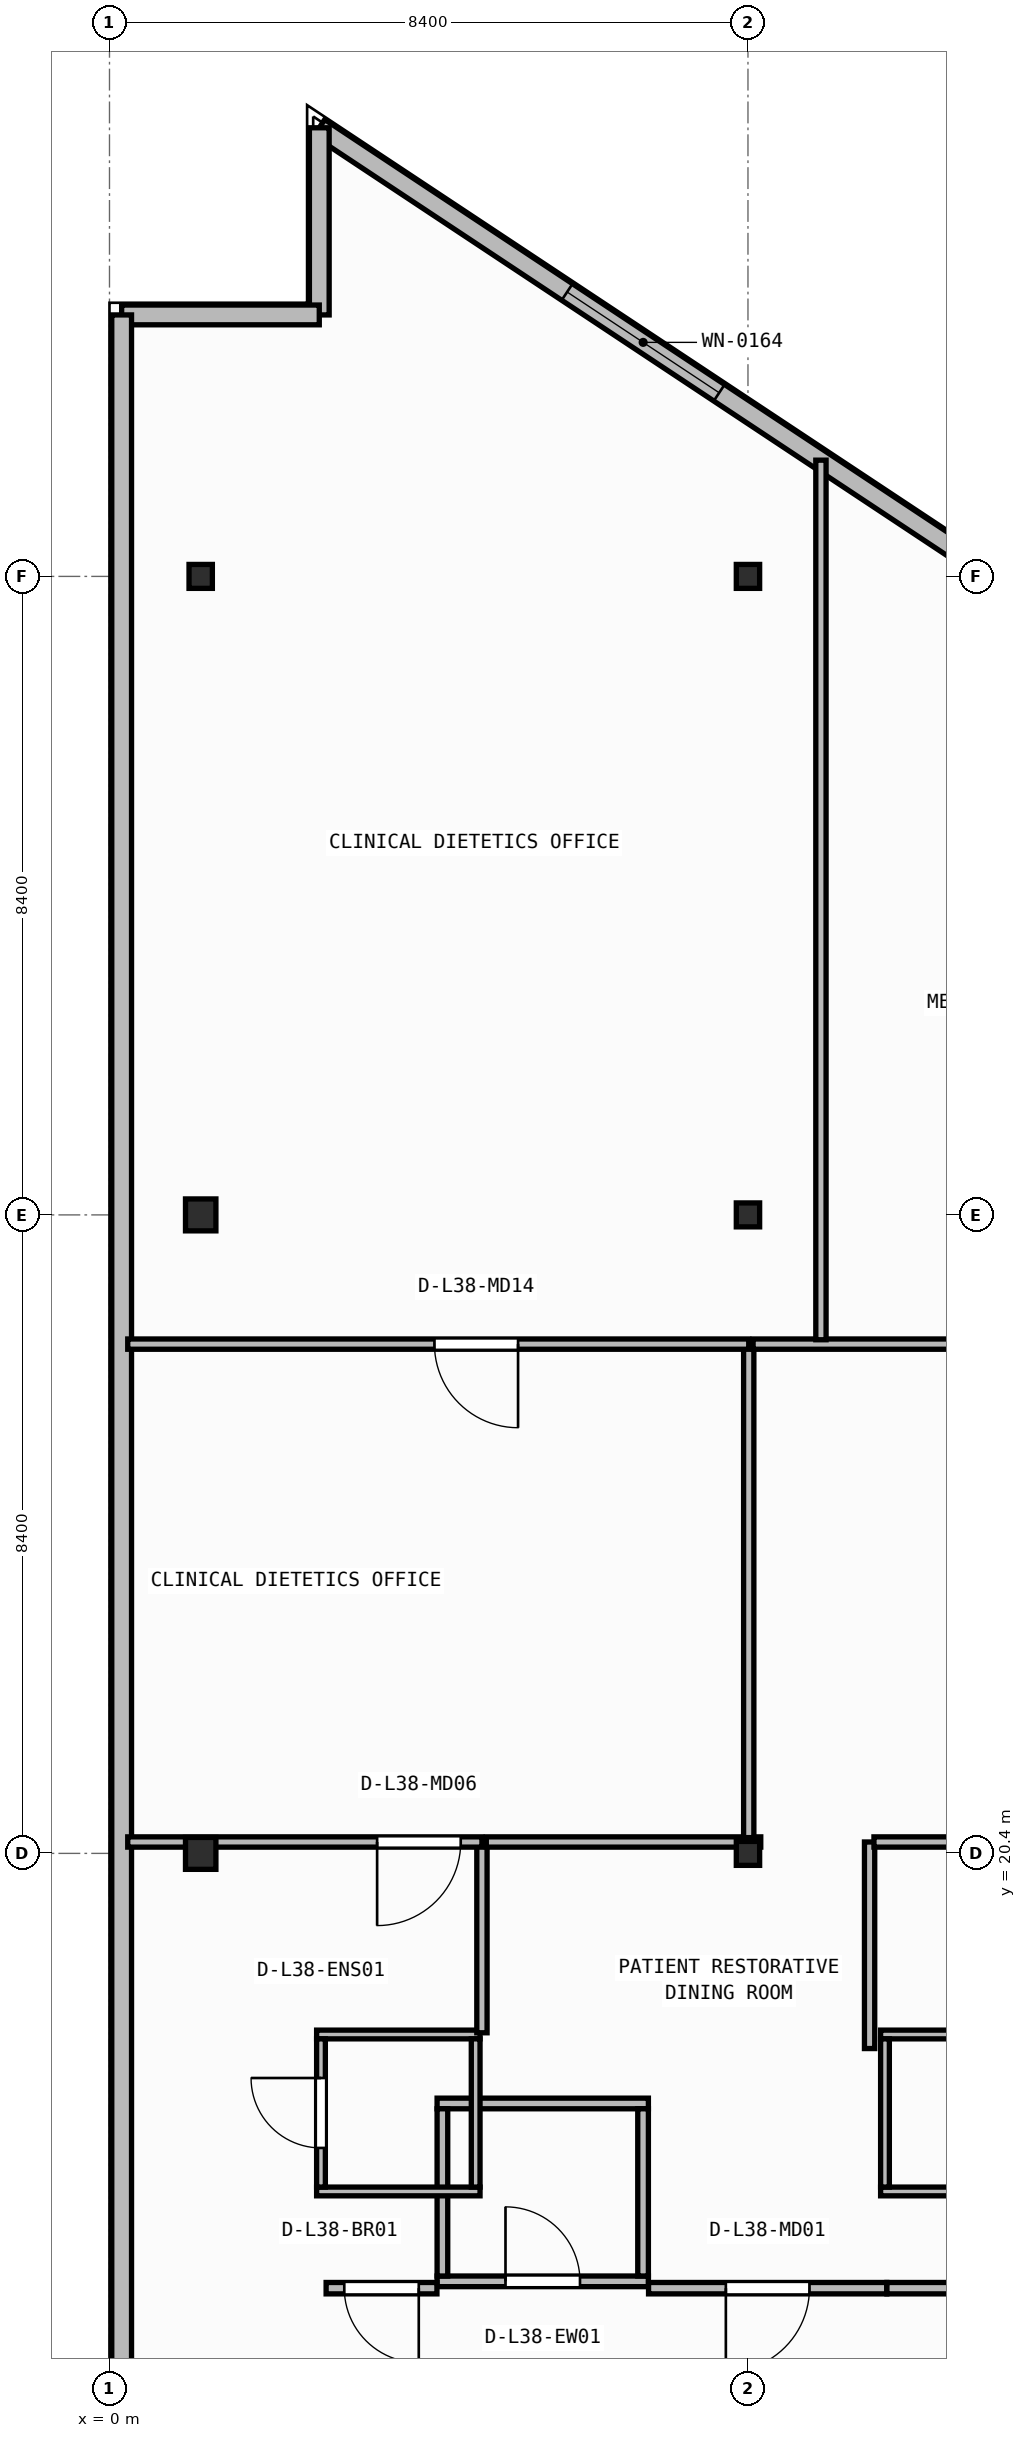
"""IFC4 building model, lengths in metres.
Left out: names, types, materials, properties, quantities, classifications, styles, units other than length and angle.
Written with IfcOpenShell. Run it as: python <this file> out.ifc"""

import sys

from ifc_helpers import new_model, si_unit, direction, frame, frame_2d, origin, origin_2d, place, context, subcontext, project, spatial, rectangle, i_section, extrude, element, fill, save


model = new_model("IFC4")
c1 = context("Model", 3, precision=1e-05, world=origin(), true_north=direction((0.0, 1.0)))
c2 = subcontext(c1, "Body", "Model", "MODEL_VIEW")
j1 = project(units=[si_unit("LENGTHUNIT", "METRE"), si_unit("PLANEANGLEUNIT", "RADIAN")], contexts=[c1])
p1 = place(None, origin())
s1 = spatial("IfcSite", under=j1, at=p1, CompositionType="ELEMENT")
p2 = place(p1, origin())
s2 = spatial("IfcBuilding", under=s1, at=p2, CompositionType="ELEMENT")
p3 = place(p2, frame((0.0, 0.0, 154.7)))
s3 = spatial("IfcBuildingStorey", under=s2, at=p3, CompositionType="ELEMENT", Elevation=154.7)
p4 = place(p3, frame((1.2, 20.4, 0.0), z_axis=(0.0, 0.0, 1.0), x_axis=(1.0, 0.0, 0.0)))
e1 = element("IfcColumn", 1, at=p4, inside=s3, PredefinedType="COLUMN", context=c2, shape_type="SweptSolid", body=[
    extrude(i_section(OverallWidth=0.4, OverallDepth=0.42, WebThickness=0.025, FlangeThickness=0.04, at=origin_2d()), origin(), (0.0, 0.0, 1.0), 3.95),
])
p5 = place(p3, frame((8.4, 20.4, 0.0), z_axis=(0.0, 0.0, 1.0), x_axis=(1.0, 0.0, 0.0)))
e2 = element("IfcColumn", 2, at=p5, inside=s3, PredefinedType="COLUMN", context=c2, shape_type="SweptSolid", body=[
    extrude(i_section(OverallWidth=0.307, OverallDepth=0.315, WebThickness=0.012, FlangeThickness=0.019, FilletRadius=0.017, at=origin_2d()), origin(), (0.0, 0.0, 1.0), 3.95),
])
p6 = place(p3, frame((1.2, 28.8, 0.0), z_axis=(0.0, 0.0, 1.0), x_axis=(1.0, 0.0, 0.0)))
e3 = element("IfcColumn", 3, at=p6, inside=s3, PredefinedType="COLUMN", context=c2, shape_type="SweptSolid", body=[
    extrude(i_section(OverallWidth=0.4, OverallDepth=0.42, WebThickness=0.025, FlangeThickness=0.04, at=origin_2d()), origin(), (0.0, 0.0, 1.0), 3.95),
])
for number, where, z_axis, x_axis in (
    (4, (8.4, 28.8, 0.0), (0.0, 0.0, 1.0), (1.0, 0.0, 0.0)),
    (5, (1.2, 37.2, 0.0), (0.0, 0.0, 1.0), (1.0, 0.0, 0.0)),
    (6, (8.4, 37.2, 0.0), (0.0, 0.0, 1.0), (1.0, 0.0, 0.0)),
):
    element("IfcColumn", number, at=place(p3, frame(where, z_axis=z_axis, x_axis=x_axis)), inside=s3, PredefinedType="COLUMN", context=c2, shape_type="SweptSolid", body=[
        extrude(i_section(OverallWidth=0.307, OverallDepth=0.315, WebThickness=0.012, FlangeThickness=0.019, FilletRadius=0.017, at=origin_2d()), origin(), (0.0, 0.0, 1.0), 3.95),
    ])
p7 = place(p3, frame((11.282, 37.456, 0.0), z_axis=(0.0, 0.0, 1.0), x_axis=(-0.833630474253, 0.552322580017, 0.0)))
e7 = element("IfcWall", 7, at=p7, inside=s3, PredefinedType="STANDARD", context=c2, shape_type="SweptSolid", body=[
    extrude(rectangle(XDim=10.223, YDim=0.26, at=frame_2d((5.111, 0.0))), origin(), (0.0, 0.0, 1.0), 3.71),
])
p8 = place(p7, frame((3.911, 0.0, 0.9)))
e8 = element("IfcOpeningElement", 8, at=p8, cuts=e7, PredefinedType="OPENING", context=c2, shape_type="SweptSolid", body=[
    extrude(rectangle(XDim=2.4, YDim=1.65, at=frame_2d((1.2, 0.825))), frame((0.0, 0.14, 0.0), z_axis=(0.0, -1.0, 0.0), x_axis=(1.0, 0.0, 0.0)), (0.0, 0.0, 1.0), 0.28),
])
p9 = place(p3, frame((2.76, 43.102, 0.0), z_axis=(0.0, 0.0, 1.0), x_axis=(0.0, -1.0, 0.0)))
e9 = element("IfcWall", 9, at=p9, inside=s3, PredefinedType="STANDARD", context=c2, shape_type="SweptSolid", body=[
    extrude(rectangle(XDim=2.462, YDim=0.26, at=frame_2d((1.231, 0.0))), origin(), (0.0, 0.0, 1.0), 3.71),
])
p10 = place(p3, frame((2.76, 40.64, 0.0), z_axis=(0.0, 0.0, 1.0), x_axis=(-1.0, 0.0, 0.0)))
e10 = element("IfcWall", 10, at=p10, inside=s3, PredefinedType="STANDARD", context=c2, shape_type="SweptSolid", body=[
    extrude(rectangle(XDim=2.6, YDim=0.26, at=frame_2d((1.3, 0.0))), origin(), (0.0, 0.0, 1.0), 3.71),
])
p11 = place(p3, frame((0.16, 40.64, 0.0), z_axis=(0.0, 0.0, 1.0), x_axis=(0.0, -1.0, 0.0)))
e11 = element("IfcWall", 11, at=p11, inside=s3, PredefinedType="STANDARD", context=c2, shape_type="SweptSolid", body=[
    extrude(rectangle(XDim=37.88, YDim=0.26, at=frame_2d((18.94, 0.0))), origin(), (0.0, 0.0, 1.0), 3.71),
])
p12 = place(p11, frame((27.795, 0.0, 0.9)))
e12 = element("IfcOpeningElement", 12, at=p12, cuts=e11, PredefinedType="OPENING", context=c2, shape_type="SweptSolid", body=[
    extrude(rectangle(XDim=2.4, YDim=1.65, at=frame_2d((1.2, 0.825))), frame((0.0, 0.14, 0.0), z_axis=(0.0, -1.0, 0.0), x_axis=(1.0, 0.0, 0.0)), (0.0, 0.0, 1.0), 0.28),
])
p13 = place(p3, frame((4.31, 14.77, 0.0), z_axis=(0.0, 0.0, 1.0), x_axis=(1.0, 0.0, 0.0)))
e13 = element("IfcWall", 13, at=p13, inside=s3, PredefinedType="PARTITIONING", context=c2, shape_type="SweptSolid", body=[
    extrude(rectangle(XDim=2.78, YDim=0.14, at=frame_2d((1.39, 0.0))), origin(), (0.0, 0.0, 1.0), 3.71),
])
p14 = place(p13, frame((0.9, 0.0, 0.0)))
e14 = element("IfcOpeningElement", 14, at=p14, cuts=e13, PredefinedType="OPENING", context=c2, shape_type="SweptSolid", body=[
    extrude(rectangle(XDim=0.98, YDim=2.1, at=frame_2d((0.49, 1.05))), frame((0.0, 0.08, 0.0), z_axis=(0.0, -1.0, 0.0), x_axis=(1.0, 0.0, 0.0)), (0.0, 0.0, 1.0), 0.16),
])
p15 = place(p3, frame((4.31, 17.11, 0.0), z_axis=(0.0, 0.0, 1.0), x_axis=(1.0, 0.0, 0.0)))
e15 = element("IfcWall", 15, at=p15, inside=s3, PredefinedType="PARTITIONING", context=c2, shape_type="SweptSolid", body=[
    extrude(rectangle(XDim=2.78, YDim=0.14, at=frame_2d((1.39, 0.0))), origin(), (0.0, 0.0, 1.0), 3.71),
])
for number, where, z_axis, x_axis in (
    (16, (4.38, 14.84, 0.0), (0.0, 0.0, 1.0), (0.0, 1.0, 0.0)),
    (17, (7.02, 14.84, 0.0), (0.0, 0.0, 1.0), (0.0, 1.0, 0.0)),
):
    element("IfcWall", number, at=place(p3, frame(where, z_axis=z_axis, x_axis=x_axis)), inside=s3, PredefinedType="PARTITIONING", context=c2, shape_type="SweptSolid", body=[
        extrude(rectangle(XDim=2.2, YDim=0.14, at=frame_2d((1.1, 0.0))), origin(), (0.0, 0.0, 1.0), 3.71),
    ])
for number, where, z_axis, x_axis in (
    (18, (2.725, 15.952, 0.0), (0.0, 0.0, 1.0), (1.0, 0.0, 0.0)),
    (19, (2.725, 18.018, 0.0), (0.0, 0.0, 1.0), (1.0, 0.0, 0.0)),
):
    element("IfcWall", number, at=place(p3, frame(where, z_axis=z_axis, x_axis=x_axis)), inside=s3, PredefinedType="PARTITIONING", context=c2, shape_type="SweptSolid", body=[
        extrude(rectangle(XDim=2.15, YDim=0.115, at=frame_2d((1.075, 0.0))), origin(), (0.0, 0.0, 1.0), 3.71),
    ])
p16 = place(p3, frame((2.782, 16.01, 0.0), z_axis=(0.0, 0.0, 1.0), x_axis=(0.0, 1.0, 0.0)))
e20 = element("IfcWall", 20, at=p16, inside=s3, PredefinedType="PARTITIONING", context=c2, shape_type="SweptSolid", body=[
    extrude(rectangle(XDim=1.95, YDim=0.115, at=frame_2d((0.975, 0.0))), origin(), (0.0, 0.0, 1.0), 3.71),
])
p17 = place(p16, frame((0.515, 0.0, 0.0)))
e21 = element("IfcOpeningElement", 21, at=p17, cuts=e20, PredefinedType="OPENING", context=c2, shape_type="SweptSolid", body=[
    extrude(rectangle(XDim=0.92, YDim=2.1, at=frame_2d((0.46, 1.05))), frame((0.0, 0.067, 0.0), z_axis=(0.0, -1.0, 0.0), x_axis=(1.0, 0.0, 0.0)), (0.0, 0.0, 1.0), 0.135),
])
p18 = place(p3, frame((4.817, 16.01, 0.0), z_axis=(0.0, 0.0, 1.0), x_axis=(0.0, 1.0, 0.0)))
e22 = element("IfcWall", 22, at=p18, inside=s3, PredefinedType="PARTITIONING", context=c2, shape_type="SweptSolid", body=[
    extrude(rectangle(XDim=1.95, YDim=0.115, at=frame_2d((0.975, 0.0))), origin(), (0.0, 0.0, 1.0), 3.71),
])
for number, where, z_axis, x_axis in (
    (23, (10.145, 15.952, 0.0), (0.0, 0.0, 1.0), (1.0, 0.0, 0.0)),
    (24, (10.145, 18.018, 0.0), (0.0, 0.0, 1.0), (1.0, 0.0, 0.0)),
):
    element("IfcWall", number, at=place(p3, frame(where, z_axis=z_axis, x_axis=x_axis)), inside=s3, PredefinedType="PARTITIONING", context=c2, shape_type="SweptSolid", body=[
        extrude(rectangle(XDim=2.15, YDim=0.115, at=frame_2d((1.075, 0.0))), origin(), (0.0, 0.0, 1.0), 3.71),
    ])
p19 = place(p3, frame((10.202, 16.01, 0.0), z_axis=(0.0, 0.0, 1.0), x_axis=(0.0, 1.0, 0.0)))
e25 = element("IfcWall", 25, at=p19, inside=s3, PredefinedType="PARTITIONING", context=c2, shape_type="SweptSolid", body=[
    extrude(rectangle(XDim=1.95, YDim=0.115, at=frame_2d((0.975, 0.0))), origin(), (0.0, 0.0, 1.0), 3.71),
])
p20 = place(p3, frame((4.308, 14.68, 0.0), z_axis=(0.0, 0.0, 1.0), x_axis=(-1.0, 0.0, 0.0)))
e26 = element("IfcWall", 26, at=p20, inside=s3, PredefinedType="PARTITIONING", context=c2, shape_type="SweptSolid", body=[
    extrude(rectangle(XDim=1.458, YDim=0.15, at=frame_2d((0.729, 0.0))), origin(), (0.0, 0.0, 1.0), 3.71),
])
p21 = place(p20, frame((0.239, 0.0, 0.0)))
e27 = element("IfcOpeningElement", 27, at=p21, cuts=e26, PredefinedType="OPENING", context=c2, shape_type="SweptSolid", body=[
    extrude(rectangle(XDim=0.98, YDim=2.1, at=frame_2d((0.49, 1.05))), frame((0.0, 0.085, 0.0), z_axis=(0.0, -1.0, 0.0), x_axis=(1.0, 0.0, 0.0)), (0.0, 0.0, 1.0), 0.17),
])
p22 = place(p3, frame((10.226, 14.68, 0.0), z_axis=(0.0, 0.0, 1.0), x_axis=(-1.0, 0.0, 0.0)))
e28 = element("IfcWall", 28, at=p22, inside=s3, PredefinedType="PARTITIONING", context=c2, shape_type="SweptSolid", body=[
    extrude(rectangle(XDim=3.134, YDim=0.15, at=frame_2d((1.567, 0.0))), origin(), (0.0, 0.0, 1.0), 3.71),
])
p23 = place(p22, frame((1.017, 0.0, 0.0)))
e29 = element("IfcOpeningElement", 29, at=p23, cuts=e28, PredefinedType="OPENING", context=c2, shape_type="SweptSolid", body=[
    extrude(rectangle(XDim=1.1, YDim=2.1, at=frame_2d((0.55, 1.05))), frame((0.0, 0.085, 0.0), z_axis=(0.0, -1.0, 0.0), x_axis=(1.0, 0.0, 0.0)), (0.0, 0.0, 1.0), 0.17),
])
p24 = place(p3, frame((14.566, 14.68, 0.0), z_axis=(0.0, 0.0, 1.0), x_axis=(-1.0, 0.0, 0.0)))
e30 = element("IfcWall", 30, at=p24, inside=s3, PredefinedType="PARTITIONING", context=c2, shape_type="SweptSolid", body=[
    extrude(rectangle(XDim=4.338, YDim=0.15, at=frame_2d((2.169, 0.0))), origin(), (0.0, 0.0, 1.0), 3.71),
])
p25 = place(p24, frame((1.619, 0.0, 0.0)))
e31 = element("IfcOpeningElement", 31, at=p25, cuts=e30, PredefinedType="OPENING", context=c2, shape_type="SweptSolid", body=[
    extrude(rectangle(XDim=1.1, YDim=2.1, at=frame_2d((0.55, 1.05))), frame((0.0, 0.085, 0.0), z_axis=(0.0, -1.0, 0.0), x_axis=(1.0, 0.0, 0.0)), (0.0, 0.0, 1.0), 0.17),
])
p26 = place(p3, frame((4.9, 18.04, 0.0), z_axis=(0.0, 0.0, 1.0), x_axis=(0.0, 1.0, 0.0)))
e32 = element("IfcWall", 32, at=p26, inside=s3, PredefinedType="PARTITIONING", context=c2, shape_type="SweptSolid", body=[
    extrude(rectangle(XDim=2.51, YDim=0.135, at=frame_2d((1.255, 0.0))), origin(), (0.0, 0.0, 1.0), 3.71),
])
p27 = place(p3, frame((4.9, 20.55, 0.0), z_axis=(0.0, 0.0, 1.0), x_axis=(-1.0, 0.0, 0.0)))
e33 = element("IfcWall", 33, at=p27, inside=s3, PredefinedType="PARTITIONING", context=c2, shape_type="SweptSolid", body=[
    extrude(rectangle(XDim=4.66, YDim=0.135, at=frame_2d((2.33, 0.0))), origin(), (0.0, 0.0, 1.0), 3.083),
])
p28 = place(p27, frame((0.279, 0.0, 0.0)))
e34 = element("IfcOpeningElement", 34, at=p28, cuts=e33, PredefinedType="OPENING", context=c2, shape_type="SweptSolid", body=[
    extrude(rectangle(XDim=1.1, YDim=2.1, at=frame_2d((0.55, 1.05))), frame((0.0, 0.077, 0.0), z_axis=(0.0, -1.0, 0.0), x_axis=(1.0, 0.0, 0.0)), (0.0, 0.0, 1.0), 0.155),
])
p29 = place(p3, frame((10.0, 17.833, 0.0), z_axis=(0.0, 0.0, 1.0), x_axis=(0.0, 1.0, 0.0)))
e35 = element("IfcWall", 35, at=p29, inside=s3, PredefinedType="PARTITIONING", context=c2, shape_type="SweptSolid", body=[
    extrude(rectangle(XDim=2.718, YDim=0.135, at=frame_2d((1.359, 0.0))), origin(), (0.0, 0.0, 1.0), 3.71),
])
p30 = place(p3, frame((8.568, 20.55, 0.0), z_axis=(0.0, 0.0, 1.0), x_axis=(-1.0, 0.0, 0.0)))
e36 = element("IfcWall", 36, at=p30, inside=s3, PredefinedType="PARTITIONING", context=c2, shape_type="SweptSolid", body=[
    extrude(rectangle(XDim=3.611, YDim=0.135, at=frame_2d((1.805, 0.0))), origin(), (0.0, 0.0, 1.0), 3.083),
])
p31 = place(p3, frame((14.34, 20.55, 0.0), z_axis=(0.0, 0.0, 1.0), x_axis=(-1.0, 0.0, 0.0)))
e37 = element("IfcWall", 37, at=p31, inside=s3, PredefinedType="PARTITIONING", context=c2, shape_type="SweptSolid", body=[
    extrude(rectangle(XDim=4.282, YDim=0.135, at=frame_2d((2.141, 0.0))), origin(), (0.0, 0.0, 1.0), 3.083),
])
p32 = place(p3, frame((8.41, 20.607, 0.0), z_axis=(0.0, 0.0, 1.0), x_axis=(0.0, 1.0, 0.0)))
e38 = element("IfcWall", 38, at=p32, inside=s3, PredefinedType="PARTITIONING", context=c2, shape_type="SweptSolid", body=[
    extrude(rectangle(XDim=6.493, YDim=0.135, at=frame_2d((3.246, 0.0))), origin(), (0.0, 0.0, 1.0), 3.152),
])
p33 = place(p3, frame((8.41, 27.1, 0.0), z_axis=(0.0, 0.0, 1.0), x_axis=(-1.0, 0.0, 0.0)))
e39 = element("IfcWall", 39, at=p33, inside=s3, PredefinedType="PARTITIONING", context=c2, shape_type="SweptSolid", body=[
    extrude(rectangle(XDim=8.17, YDim=0.135, at=frame_2d((4.085, 0.0))), origin(), (0.0, 0.0, 1.0), 3.71),
])
p34 = place(p33, frame((3.035, 0.0, 0.0)))
e40 = element("IfcOpeningElement", 40, at=p34, cuts=e39, PredefinedType="OPENING", context=c2, shape_type="SweptSolid", body=[
    extrude(rectangle(XDim=1.1, YDim=2.1, at=frame_2d((0.55, 1.05))), frame((0.0, 0.077, 0.0), z_axis=(0.0, -1.0, 0.0), x_axis=(1.0, 0.0, 0.0)), (0.0, 0.0, 1.0), 0.155),
])
p35 = place(p3, frame((19.12, 27.1, 0.0), z_axis=(0.0, 0.0, 1.0), x_axis=(-1.0, 0.0, 0.0)))
e41 = element("IfcWall", 41, at=p35, inside=s3, PredefinedType="PARTITIONING", context=c2, shape_type="SweptSolid", body=[
    extrude(rectangle(XDim=10.653, YDim=0.135, at=frame_2d((5.326, 0.0))), origin(), (0.0, 0.0, 1.0), 3.71),
])
p36 = place(p3, frame((9.36, 27.157, 0.0), z_axis=(0.0, 0.0, 1.0), x_axis=(0.0, 1.0, 0.0)))
e42 = element("IfcWall", 42, at=p36, inside=s3, PredefinedType="PARTITIONING", context=c2, shape_type="SweptSolid", body=[
    extrude(rectangle(XDim=11.572, YDim=0.135, at=frame_2d((5.786, 0.0))), origin(), (0.0, 0.0, 1.0), 3.71),
])
p37 = place(p8, origin())
e43 = element("IfcWindow", 43, at=p37, inside=s3, PartitioningType="SINGLE_PANEL", PredefinedType="WINDOW", context=c2, shape_type="SweptSolid", body=[
    extrude(rectangle(XDim=2.4, YDim=1.65, at=frame_2d((1.2, 0.825))), frame((0.0, 0.03, 0.0), z_axis=(0.0, -1.0, 0.0), x_axis=(1.0, 0.0, 0.0)), (0.0, 0.0, 1.0), 0.06),
])
fill(e8, e43)
p38 = place(p14, origin())
e44 = element("IfcDoor", 44, at=p38, inside=s3, OperationType="SINGLE_SWING_LEFT", PredefinedType="DOOR", context=c2, shape_type="SweptSolid", body=[
    extrude(rectangle(XDim=0.98, YDim=2.1, at=frame_2d((0.49, 1.05))), frame((0.0, 0.025, 0.0), z_axis=(0.0, -1.0, 0.0), x_axis=(1.0, 0.0, 0.0)), (0.0, 0.0, 1.0), 0.05),
])
fill(e14, e44)
p39 = place(p17, origin())
e45 = element("IfcDoor", 45, at=p39, inside=s3, OperationType="SINGLE_SWING_RIGHT", PredefinedType="DOOR", context=c2, shape_type="SweptSolid", body=[
    extrude(rectangle(XDim=0.92, YDim=2.1, at=frame_2d((0.46, 1.05))), frame((0.0, 0.025, 0.0), z_axis=(0.0, -1.0, 0.0), x_axis=(1.0, 0.0, 0.0)), (0.0, 0.0, 1.0), 0.05),
])
fill(e21, e45)
p40 = place(p21, origin())
e46 = element("IfcDoor", 46, at=p40, inside=s3, OperationType="SINGLE_SWING_LEFT", PredefinedType="DOOR", context=c2, shape_type="SweptSolid", body=[
    extrude(rectangle(XDim=0.98, YDim=2.1, at=frame_2d((0.49, 1.05))), frame((0.0, 0.025, 0.0), z_axis=(0.0, -1.0, 0.0), x_axis=(1.0, 0.0, 0.0)), (0.0, 0.0, 1.0), 0.05),
])
fill(e27, e46)
p41 = place(p23, origin())
e47 = element("IfcDoor", 47, at=p41, inside=s3, OperationType="SINGLE_SWING_RIGHT", PredefinedType="DOOR", context=c2, shape_type="SweptSolid", body=[
    extrude(rectangle(XDim=1.1, YDim=2.1, at=frame_2d((0.55, 1.05))), frame((0.0, 0.025, 0.0), z_axis=(0.0, -1.0, 0.0), x_axis=(1.0, 0.0, 0.0)), (0.0, 0.0, 1.0), 0.05),
])
fill(e29, e47)
p42 = place(p28, origin())
e48 = element("IfcDoor", 48, at=p42, inside=s3, OperationType="SINGLE_SWING_RIGHT", PredefinedType="DOOR", context=c2, shape_type="SweptSolid", body=[
    extrude(rectangle(XDim=1.1, YDim=2.1, at=frame_2d((0.55, 1.05))), frame((0.0, 0.025, 0.0), z_axis=(0.0, -1.0, 0.0), x_axis=(1.0, 0.0, 0.0)), (0.0, 0.0, 1.0), 0.05),
])
fill(e34, e48)
p43 = place(p34, origin())
e49 = element("IfcDoor", 49, at=p43, inside=s3, OperationType="SINGLE_SWING_LEFT", PredefinedType="DOOR", context=c2, shape_type="SweptSolid", body=[
    extrude(rectangle(XDim=1.1, YDim=2.1, at=frame_2d((0.55, 1.05))), frame((0.0, 0.025, 0.0), z_axis=(0.0, -1.0, 0.0), x_axis=(1.0, 0.0, 0.0)), (0.0, 0.0, 1.0), 0.05),
])
fill(e40, e49)
save(model, sys.argv[1])
